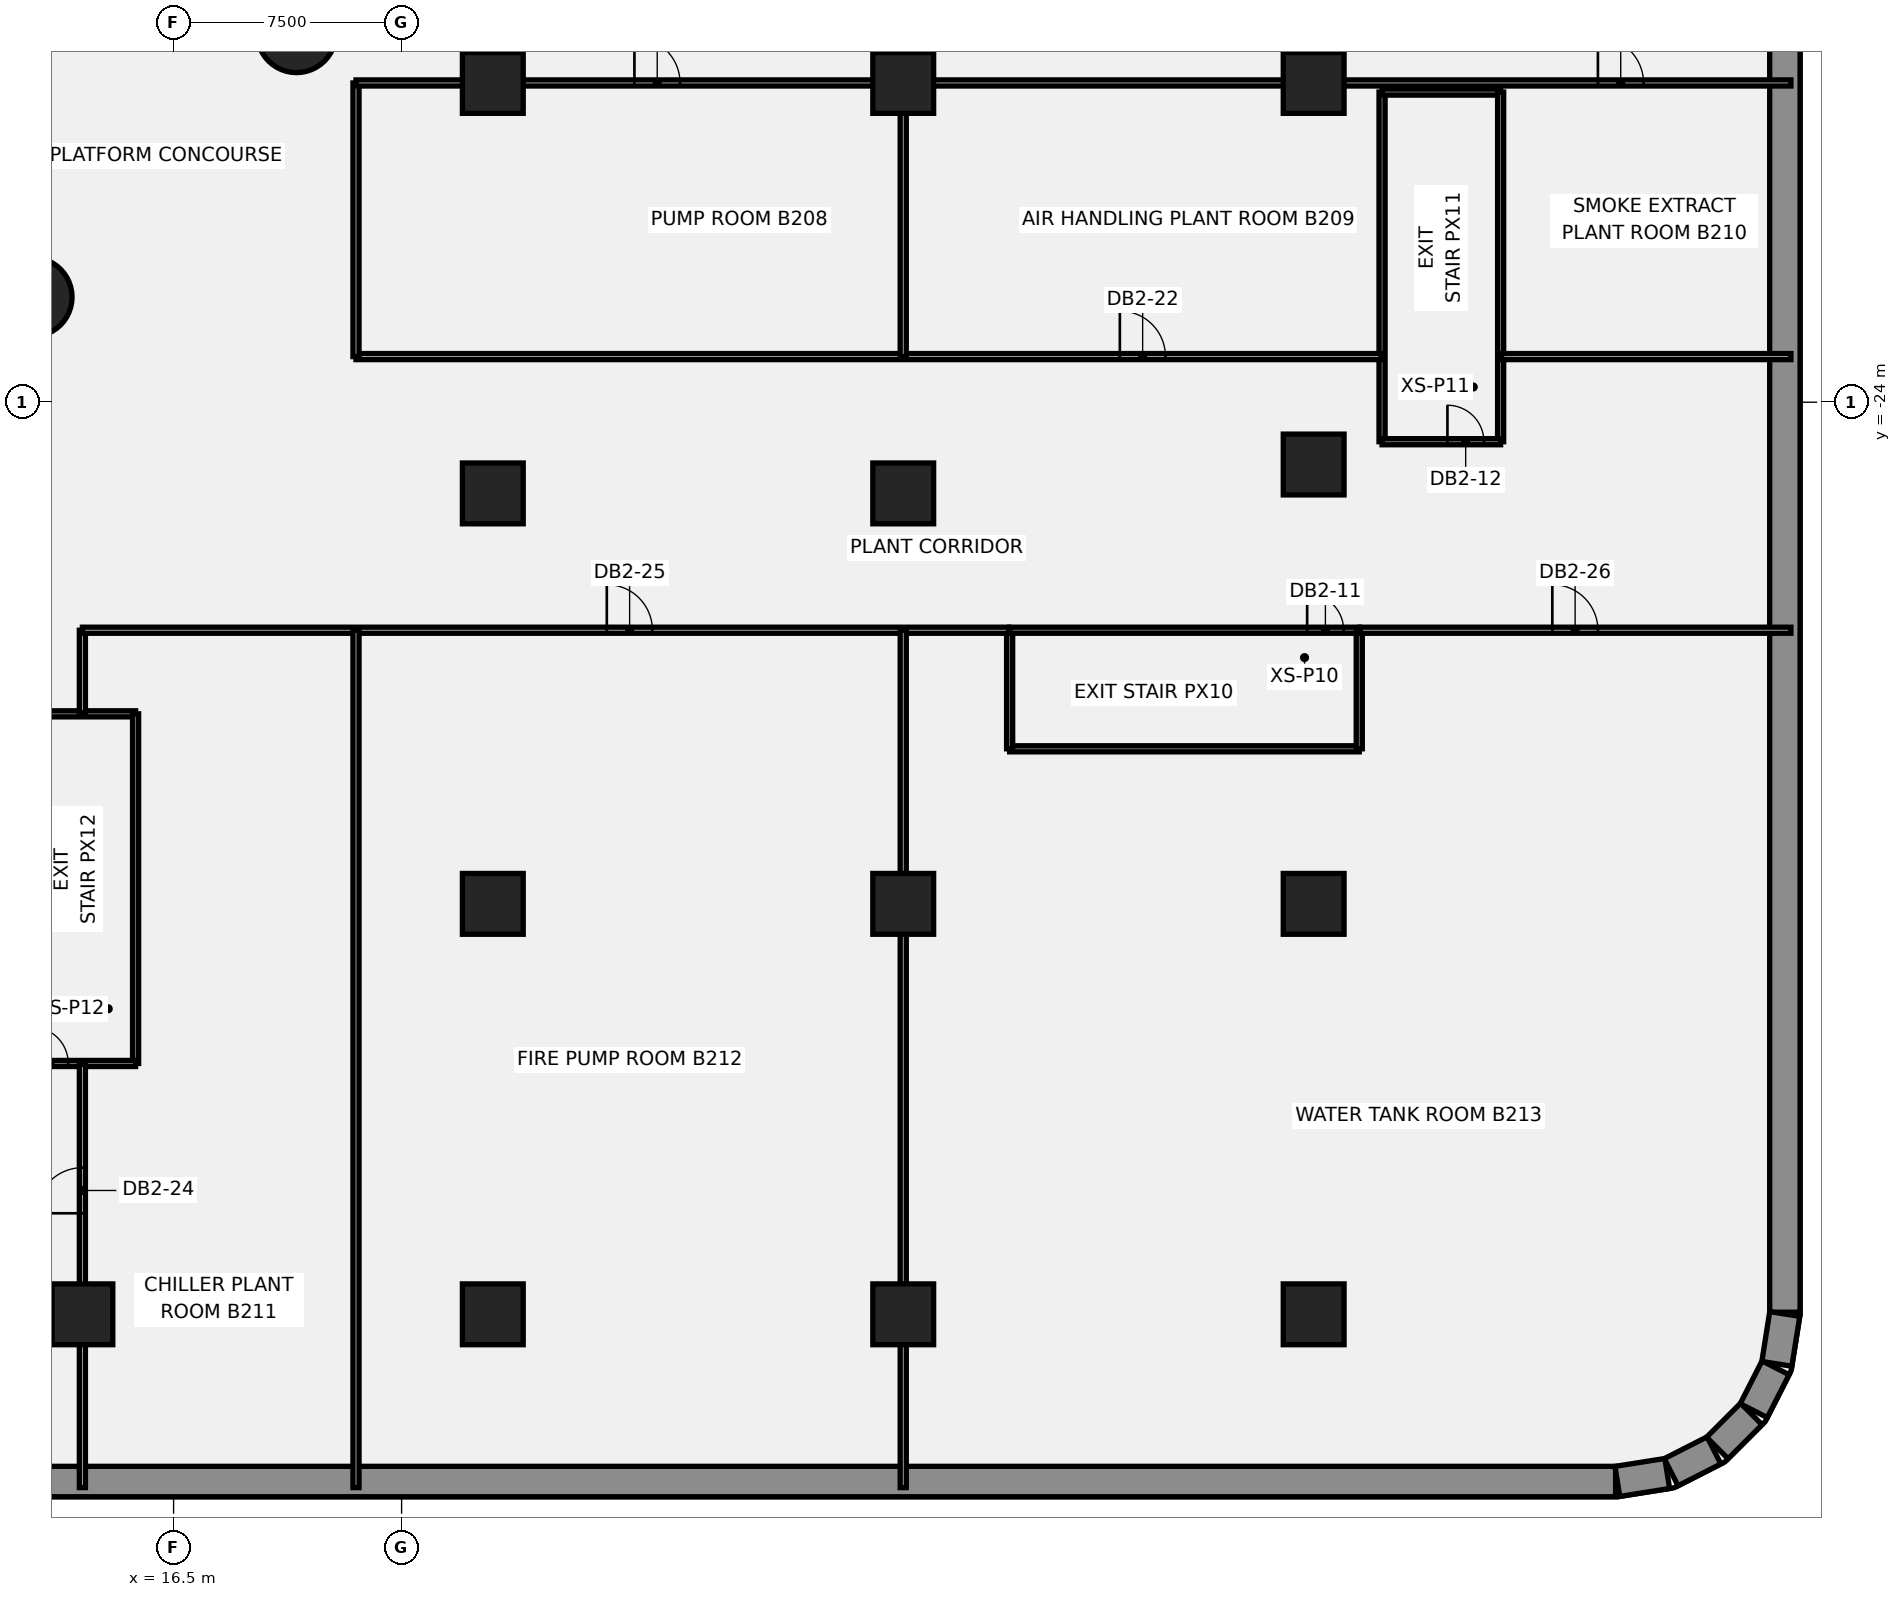
"""IFC4 building model, lengths in metres.
Left out: names, types, materials, properties, quantities, classifications, styles, units other than length and angle.
Written with IfcOpenShell. Run it as: python <this file> out.ifc"""

import sys

from ifc_helpers import new_model, si_unit, direction, frame, frame_2d, origin, origin_2d, place, context, subcontext, project, spatial, rectangle, circle, extrude, element, fill, save


model = new_model("IFC4")
c1 = context("Model", 3, precision=1e-05, world=origin(), true_north=direction((0.0, 1.0)))
c2 = subcontext(c1, "Body", "Model", "MODEL_VIEW")
j1 = project(units=[si_unit("LENGTHUNIT", "METRE"), si_unit("PLANEANGLEUNIT", "RADIAN")], contexts=[c1])
p1 = place(None, origin())
s1 = spatial("IfcSite", under=j1, at=p1, CompositionType="ELEMENT")
p2 = place(p1, origin())
s2 = spatial("IfcBuilding", under=s1, at=p2, CompositionType="ELEMENT")
p3 = place(p2, frame((0.0, 0.0, -14.0)))
s3 = spatial("IfcBuildingStorey", under=s2, at=p3, CompositionType="ELEMENT", Elevation=-14.0)
p4 = place(p3, frame((63.931, -59.5, -0.45), z_axis=(0.0, 0.0, 1.0), x_axis=(-1.0, 0.0, 0.0)))
e1 = element("IfcWall", 1, at=p4, inside=s3, PredefinedType="SOLIDWALL", context=c2, shape_type="SweptSolid", body=[
    extrude(rectangle(XDim=127.863, YDim=1.0, at=frame_2d((63.931, 0.0))), origin(), (0.0, 0.0, 1.0), 7.0),
])
p5 = place(p3, frame((69.5, 53.931, -0.45), z_axis=(0.0, 0.0, 1.0), x_axis=(0.0, -1.0, 0.0)))
e2 = element("IfcWall", 2, at=p5, inside=s3, PredefinedType="SOLIDWALL", context=c2, shape_type="SweptSolid", body=[
    extrude(rectangle(XDim=107.863, YDim=1.0, at=frame_2d((53.931, 0.0))), origin(), (0.0, 0.0, 1.0), 7.0),
])
p6 = place(p3, frame((69.495, -53.99, -0.45), z_axis=(0.0, 0.0, 1.0), x_axis=(-0.156430639922, -0.987688946427, 0.0)))
e3 = element("IfcWall", 3, at=p6, inside=s3, PredefinedType="SOLIDWALL", context=c2, shape_type="SweptSolid", body=[
    extrude(rectangle(XDim=1.661, YDim=1.0, at=frame_2d((0.83, 0.0))), origin(), (0.0, 0.0, 1.0), 7.0),
])
for number, where, z_axis, x_axis in (
    (4, (69.194, -55.759, -0.45), (0.0, 0.0, 1.0), (-0.454, -0.891, 0.0)),
    (5, (68.396, -57.278, -0.45), (0.0, 0.0, 1.0), (-0.707, -0.707, 0.0)),
    (6, (67.168, -58.476, -0.45), (0.0, 0.0, 1.0), (-0.891, -0.454, 0.0)),
):
    element("IfcWall", number, at=place(p3, frame(where, z_axis=z_axis, x_axis=x_axis)), inside=s3, PredefinedType="SOLIDWALL", context=c2, shape_type="SweptSolid", body=[
        extrude(rectangle(XDim=1.581, YDim=1.0, at=frame_2d((0.791, 0.0))), origin(), (0.0, 0.0, 1.0), 7.0),
    ])
p7 = place(p3, frame((65.63, -59.236, -0.45), z_axis=(0.0, 0.0, 1.0), x_axis=(-0.987688946427, -0.156430639922, 0.0)))
e7 = element("IfcWall", 7, at=p7, inside=s3, PredefinedType="SOLIDWALL", context=c2, shape_type="SweptSolid", body=[
    extrude(rectangle(XDim=1.661, YDim=1.0, at=frame_2d((0.83, 0.0))), origin(), (0.0, 0.0, 1.0), 7.0),
])
for number, where, z_axis, x_axis in (
    (8, (11.86, -20.543, -0.45), (0.0, 0.0, 1.0), (1.0, 0.0, 0.0)),
    (9, (20.543, -11.86, -0.45), (0.0, 0.0, 1.0), (1.0, 0.0, 0.0)),
):
    element("IfcColumn", number, at=place(p3, frame(where, z_axis=z_axis, x_axis=x_axis)), inside=s3, PredefinedType="COLUMN", context=c2, shape_type="SweptSolid", body=[
        extrude(circle(Radius=1.3, at=origin_2d()), origin(), (0.0, 0.0, 1.0), 7.0),
    ])
for number, where, z_axis, x_axis in (
    (10, (13.5, -54.0, -0.45), (0.0, 0.0, 1.0), (1.0, 0.0, 0.0)),
    (11, (27.0, -54.0, -0.45), (0.0, 0.0, 1.0), (1.0, 0.0, 0.0)),
    (12, (27.0, -40.5, -0.45), (0.0, 0.0, 1.0), (1.0, 0.0, 0.0)),
    (13, (27.0, -27.0, -0.45), (0.0, 0.0, 1.0), (1.0, 0.0, 0.0)),
    (14, (27.0, -13.5, -0.45), (0.0, 0.0, 1.0), (1.0, 0.0, 0.0)),
    (15, (40.5, -54.0, -0.45), (0.0, 0.0, 1.0), (1.0, 0.0, 0.0)),
    (16, (40.5, -40.5, -0.45), (0.0, 0.0, 1.0), (1.0, 0.0, 0.0)),
    (17, (40.5, -27.0, -0.45), (0.0, 0.0, 1.0), (1.0, 0.0, 0.0)),
    (18, (40.5, -13.5, -0.45), (0.0, 0.0, 1.0), (1.0, 0.0, 0.0)),
    (19, (54.0, -54.0, -0.45), (0.0, 0.0, 1.0), (1.0, 0.0, 0.0)),
    (20, (54.0, -40.5, -0.45), (0.0, 0.0, 1.0), (1.0, 0.0, 0.0)),
    (21, (54.0, -26.05, -0.45), (0.0, 0.0, 1.0), (1.0, 0.0, 0.0)),
    (22, (54.0, -13.5, -0.45), (0.0, 0.0, 1.0), (1.0, 0.0, 0.0)),
):
    element("IfcColumn", number, at=place(p3, frame(where, z_axis=z_axis, x_axis=x_axis)), inside=s3, PredefinedType="COLUMN", context=c2, shape_type="SweptSolid", body=[
        extrude(rectangle(XDim=2.0, YDim=2.0, at=origin_2d()), origin(), (0.0, 0.0, 1.0), 7.0),
    ])
p8 = place(p3, frame((11.35, -34.25, 0.0), z_axis=(0.0, 0.0, 1.0), x_axis=(1.0, 0.0, 0.0)))
e23 = element("IfcWall", 23, at=p8, inside=s3, PredefinedType="PARTITIONING", context=c2, shape_type="SweptSolid", body=[
    extrude(rectangle(XDim=3.9, YDim=0.2, at=frame_2d((1.95, 0.0))), origin(), (0.0, 0.0, 1.0), 6.55),
])
p9 = place(p3, frame((15.25, -45.75, 0.0), z_axis=(0.0, 0.0, 1.0), x_axis=(0.0, 1.0, 0.0)))
e24 = element("IfcWall", 24, at=p9, inside=s3, PredefinedType="PARTITIONING", context=c2, shape_type="SweptSolid", body=[
    extrude(rectangle(XDim=11.5, YDim=0.2, at=frame_2d((5.75, 0.0))), origin(), (0.0, 0.0, 1.0), 6.55),
])
p10 = place(p3, frame((11.35, -45.75, 0.0), z_axis=(0.0, 0.0, 1.0), x_axis=(1.0, 0.0, 0.0)))
e25 = element("IfcWall", 25, at=p10, inside=s3, PredefinedType="PARTITIONING", context=c2, shape_type="SweptSolid", body=[
    extrude(rectangle(XDim=3.9, YDim=0.2, at=frame_2d((1.95, 0.0))), origin(), (0.0, 0.0, 1.0), 6.55),
])
p11 = place(p10, frame((0.485, 0.0, 0.0)))
e26 = element("IfcOpeningElement", 26, at=p11, cuts=e25, PredefinedType="OPENING", context=c2, shape_type="SweptSolid", body=[
    extrude(rectangle(XDim=1.2, YDim=2.1, at=frame_2d((0.6, 1.05))), frame((0.0, 0.11, 0.0), z_axis=(0.0, -1.0, 0.0), x_axis=(1.0, 0.0, 0.0)), (0.0, 0.0, 1.0), 0.22),
])
p12 = place(p3, frame((44.0, -35.4, 0.0), z_axis=(0.0, 0.0, 1.0), x_axis=(1.0, 0.0, 0.0)))
e27 = element("IfcWall", 27, at=p12, inside=s3, PredefinedType="PARTITIONING", context=c2, shape_type="SweptSolid", body=[
    extrude(rectangle(XDim=11.5, YDim=0.2, at=frame_2d((5.75, 0.0))), origin(), (0.0, 0.0, 1.0), 6.55),
])
p13 = place(p3, frame((44.0, -35.4, 0.0), z_axis=(0.0, 0.0, 1.0), x_axis=(0.0, 1.0, 0.0)))
e28 = element("IfcWall", 28, at=p13, inside=s3, PredefinedType="PARTITIONING", context=c2, shape_type="SweptSolid", body=[
    extrude(rectangle(XDim=3.9, YDim=0.2, at=frame_2d((1.95, 0.0))), origin(), (0.0, 0.0, 1.0), 6.55),
])
p14 = place(p3, frame((44.0, -31.5, 0.0), z_axis=(0.0, 0.0, 1.0), x_axis=(1.0, 0.0, 0.0)))
e29 = element("IfcWall", 29, at=p14, inside=s3, PredefinedType="PARTITIONING", context=c2, shape_type="SweptSolid", body=[
    extrude(rectangle(XDim=11.5, YDim=0.2, at=frame_2d((5.75, 0.0))), origin(), (0.0, 0.0, 1.0), 6.55),
])
p15 = place(p14, frame((9.786, 0.0, 0.0)))
e30 = element("IfcOpeningElement", 30, at=p15, cuts=e29, PredefinedType="OPENING", context=c2, shape_type="SweptSolid", body=[
    extrude(rectangle(XDim=1.2, YDim=2.1, at=frame_2d((0.6, 1.05))), frame((0.0, 0.11, 0.0), z_axis=(0.0, -1.0, 0.0), x_axis=(1.0, 0.0, 0.0)), (0.0, 0.0, 1.0), 0.22),
])
p16 = place(p3, frame((55.5, -35.4, 0.0), z_axis=(0.0, 0.0, 1.0), x_axis=(0.0, 1.0, 0.0)))
e31 = element("IfcWall", 31, at=p16, inside=s3, PredefinedType="PARTITIONING", context=c2, shape_type="SweptSolid", body=[
    extrude(rectangle(XDim=3.9, YDim=0.2, at=frame_2d((1.95, 0.0))), origin(), (0.0, 0.0, 1.0), 6.55),
])
p17 = place(p3, frame((56.25, -25.3, 0.0), z_axis=(0.0, 0.0, 1.0), x_axis=(0.0, 1.0, 0.0)))
e32 = element("IfcWall", 32, at=p17, inside=s3, PredefinedType="PARTITIONING", context=c2, shape_type="SweptSolid", body=[
    extrude(rectangle(XDim=11.5, YDim=0.2, at=frame_2d((5.75, 0.0))), origin(), (0.0, 0.0, 1.0), 6.55),
])
p18 = place(p3, frame((56.25, -13.8, 0.0), z_axis=(0.0, 0.0, 1.0), x_axis=(1.0, 0.0, 0.0)))
e33 = element("IfcWall", 33, at=p18, inside=s3, PredefinedType="PARTITIONING", context=c2, shape_type="SweptSolid", body=[
    extrude(rectangle(XDim=3.9, YDim=0.2, at=frame_2d((1.95, 0.0))), origin(), (0.0, 0.0, 1.0), 6.55),
])
p19 = place(p3, frame((60.15, -25.3, 0.0), z_axis=(0.0, 0.0, 1.0), x_axis=(0.0, 1.0, 0.0)))
e34 = element("IfcWall", 34, at=p19, inside=s3, PredefinedType="PARTITIONING", context=c2, shape_type="SweptSolid", body=[
    extrude(rectangle(XDim=11.5, YDim=0.2, at=frame_2d((5.75, 0.0))), origin(), (0.0, 0.0, 1.0), 6.55),
])
p20 = place(p3, frame((56.25, -25.3, 0.0), z_axis=(0.0, 0.0, 1.0), x_axis=(1.0, 0.0, 0.0)))
e35 = element("IfcWall", 35, at=p20, inside=s3, PredefinedType="PARTITIONING", context=c2, shape_type="SweptSolid", body=[
    extrude(rectangle(XDim=3.9, YDim=0.2, at=frame_2d((1.95, 0.0))), origin(), (0.0, 0.0, 1.0), 6.55),
])
p21 = place(p20, frame((2.15, 0.0, 0.0)))
e36 = element("IfcOpeningElement", 36, at=p21, cuts=e35, PredefinedType="OPENING", context=c2, shape_type="SweptSolid", body=[
    extrude(rectangle(XDim=1.2, YDim=2.1, at=frame_2d((0.6, 1.05))), frame((0.0, 0.11, 0.0), z_axis=(0.0, -1.0, 0.0), x_axis=(1.0, 0.0, 0.0)), (0.0, 0.0, 1.0), 0.22),
])
p22 = place(p3, frame((13.5, -59.699, 0.0), z_axis=(0.0, 0.0, 1.0), x_axis=(0.0, 1.0, 0.0)))
e37 = element("IfcWall", 37, at=p22, inside=s3, PredefinedType="PARTITIONING", context=c2, shape_type="SweptSolid", body=[
    extrude(rectangle(XDim=13.919, YDim=0.2, at=frame_2d((6.959, 0.0))), origin(), (0.0, 0.0, 1.0), 6.55),
])
p23 = place(p22, frame((9.022, 0.0, 0.0)))
e38 = element("IfcOpeningElement", 38, at=p23, cuts=e37, PredefinedType="OPENING", context=c2, shape_type="SweptSolid", body=[
    extrude(rectangle(XDim=1.5, YDim=2.1, at=frame_2d((0.75, 1.05))), frame((0.0, 0.11, 0.0), z_axis=(0.0, -1.0, 0.0), x_axis=(1.0, 0.0, 0.0)), (0.0, 0.0, 1.0), 0.22),
])
p24 = place(p3, frame((13.5, -34.22, 0.0), z_axis=(0.0, 0.0, 1.0), x_axis=(0.0, 1.0, 0.0)))
e39 = element("IfcWall", 39, at=p24, inside=s3, PredefinedType="PARTITIONING", context=c2, shape_type="SweptSolid", body=[
    extrude(rectangle(XDim=2.72, YDim=0.2, at=frame_2d((1.36, 0.0))), origin(), (0.0, 0.0, 1.0), 6.55),
])
p25 = place(p3, frame((13.5, -31.5, 0.0), z_axis=(0.0, 0.0, 1.0), x_axis=(1.0, 0.0, 0.0)))
e40 = element("IfcWall", 40, at=p25, inside=s3, PredefinedType="PARTITIONING", context=c2, shape_type="SweptSolid", body=[
    extrude(rectangle(XDim=30.47, YDim=0.2, at=frame_2d((15.235, 0.0))), origin(), (0.0, 0.0, 1.0), 6.55),
])
p26 = place(p25, frame((17.25, 0.0, 0.0)))
e41 = element("IfcOpeningElement", 41, at=p26, cuts=e40, PredefinedType="OPENING", context=c2, shape_type="SweptSolid", body=[
    extrude(rectangle(XDim=1.5, YDim=2.1, at=frame_2d((0.75, 1.05))), frame((0.0, 0.11, 0.0), z_axis=(0.0, -1.0, 0.0), x_axis=(1.0, 0.0, 0.0)), (0.0, 0.0, 1.0), 0.22),
])
for number, where, z_axis, x_axis in (
    (42, (22.5, -59.699, 0.0), (0.0, 0.0, 1.0), (0.0, 1.0, 0.0)),
    (43, (40.5, -59.699, 0.0), (0.0, 0.0, 1.0), (0.0, 1.0, 0.0)),
):
    element("IfcWall", number, at=place(p3, frame(where, z_axis=z_axis, x_axis=x_axis)), inside=s3, PredefinedType="PARTITIONING", context=c2, shape_type="SweptSolid", body=[
        extrude(rectangle(XDim=28.199, YDim=0.2, at=frame_2d((14.1, 0.0))), origin(), (0.0, 0.0, 1.0), 6.55),
    ])
p27 = place(p3, frame((22.5, -22.5, 0.0), z_axis=(0.0, 0.0, 1.0), x_axis=(1.0, 0.0, 0.0)))
e44 = element("IfcWall", 44, at=p27, inside=s3, PredefinedType="PARTITIONING", context=c2, shape_type="SweptSolid", body=[
    extrude(rectangle(XDim=33.72, YDim=0.2, at=frame_2d((16.86, 0.0))), origin(), (0.0, 0.0, 1.0), 6.55),
])
p28 = place(p27, frame((25.125, 0.0, 0.0)))
e45 = element("IfcOpeningElement", 45, at=p28, cuts=e44, PredefinedType="OPENING", context=c2, shape_type="SweptSolid", body=[
    extrude(rectangle(XDim=1.5, YDim=2.1, at=frame_2d((0.75, 1.05))), frame((0.0, 0.11, 0.0), z_axis=(0.0, -1.0, 0.0), x_axis=(1.0, 0.0, 0.0)), (0.0, 0.0, 1.0), 0.22),
])
for number, where, z_axis, x_axis in (
    (46, (40.5, -22.5, 0.0), (0.0, 0.0, 1.0), (0.0, 1.0, 0.0)),
    (47, (22.5, -22.5, 0.0), (0.0, 0.0, 1.0), (0.0, 1.0, 0.0)),
):
    element("IfcWall", number, at=place(p3, frame(where, z_axis=z_axis, x_axis=x_axis)), inside=s3, PredefinedType="PARTITIONING", context=c2, shape_type="SweptSolid", body=[
        extrude(rectangle(XDim=9.0, YDim=0.2, at=frame_2d((4.5, 0.0))), origin(), (0.0, 0.0, 1.0), 6.55),
    ])
p29 = place(p3, frame((22.5, -13.5, 0.0), z_axis=(0.0, 0.0, 1.0), x_axis=(1.0, 0.0, 0.0)))
e48 = element("IfcWall", 48, at=p29, inside=s3, PredefinedType="PARTITIONING", context=c2, shape_type="SweptSolid", body=[
    extrude(rectangle(XDim=47.199, YDim=0.2, at=frame_2d((23.6, 0.0))), origin(), (0.0, 0.0, 1.0), 6.55),
])
p30 = place(p29, frame((9.158, 0.0, 0.0)))
e49 = element("IfcOpeningElement", 49, at=p30, cuts=e48, PredefinedType="OPENING", context=c2, shape_type="SweptSolid", body=[
    extrude(rectangle(XDim=1.5, YDim=2.1, at=frame_2d((0.75, 1.05))), frame((0.0, 0.11, 0.0), z_axis=(0.0, -1.0, 0.0), x_axis=(1.0, 0.0, 0.0)), (0.0, 0.0, 1.0), 0.22),
])
p31 = place(p29, frame((40.85, 0.0, 0.0)))
e50 = element("IfcOpeningElement", 50, at=p31, cuts=e48, PredefinedType="OPENING", context=c2, shape_type="SweptSolid", body=[
    extrude(rectangle(XDim=1.5, YDim=2.1, at=frame_2d((0.75, 1.05))), frame((0.0, 0.11, 0.0), z_axis=(0.0, -1.0, 0.0), x_axis=(1.0, 0.0, 0.0)), (0.0, 0.0, 1.0), 0.22),
])
p32 = place(p3, frame((55.53, -31.5, 0.0), z_axis=(0.0, 0.0, 1.0), x_axis=(1.0, 0.0, 0.0)))
e51 = element("IfcWall", 51, at=p32, inside=s3, PredefinedType="PARTITIONING", context=c2, shape_type="SweptSolid", body=[
    extrude(rectangle(XDim=14.169, YDim=0.2, at=frame_2d((7.084, 0.0))), origin(), (0.0, 0.0, 1.0), 6.55),
])
p33 = place(p32, frame((6.32, 0.0, 0.0)))
e52 = element("IfcOpeningElement", 52, at=p33, cuts=e51, PredefinedType="OPENING", context=c2, shape_type="SweptSolid", body=[
    extrude(rectangle(XDim=1.5, YDim=2.1, at=frame_2d((0.75, 1.05))), frame((0.0, 0.11, 0.0), z_axis=(0.0, -1.0, 0.0), x_axis=(1.0, 0.0, 0.0)), (0.0, 0.0, 1.0), 0.22),
])
p34 = place(p3, frame((60.18, -22.5, 0.0), z_axis=(0.0, 0.0, 1.0), x_axis=(1.0, 0.0, 0.0)))
e53 = element("IfcWall", 53, at=p34, inside=s3, PredefinedType="PARTITIONING", context=c2, shape_type="SweptSolid", body=[
    extrude(rectangle(XDim=9.519, YDim=0.2, at=frame_2d((4.76, 0.0))), origin(), (0.0, 0.0, 1.0), 6.55),
])
p35 = place(p15, origin())
e54 = element("IfcDoor", 54, at=p35, inside=s3, OperationType="SINGLE_SWING_LEFT", PredefinedType="DOOR", context=c2, shape_type="SweptSolid", body=[
    extrude(rectangle(XDim=1.2, YDim=2.1, at=frame_2d((0.6, 1.05))), frame((0.0, 0.025, 0.0), z_axis=(0.0, -1.0, 0.0), x_axis=(1.0, 0.0, 0.0)), (0.0, 0.0, 1.0), 0.05),
])
fill(e30, e54)
p36 = place(p21, origin())
e55 = element("IfcDoor", 55, at=p36, inside=s3, OperationType="SINGLE_SWING_RIGHT", PredefinedType="DOOR", context=c2, shape_type="SweptSolid", body=[
    extrude(rectangle(XDim=1.2, YDim=2.1, at=frame_2d((0.6, 1.05))), frame((0.0, 0.025, 0.0), z_axis=(0.0, -1.0, 0.0), x_axis=(1.0, 0.0, 0.0)), (0.0, 0.0, 1.0), 0.05),
])
fill(e36, e55)
p37 = place(p11, origin())
e56 = element("IfcDoor", 56, at=p37, inside=s3, OperationType="SINGLE_SWING_LEFT", PredefinedType="DOOR", context=c2, shape_type="SweptSolid", body=[
    extrude(rectangle(XDim=1.2, YDim=2.1, at=frame_2d((0.6, 1.05))), frame((0.0, 0.025, 0.0), z_axis=(0.0, -1.0, 0.0), x_axis=(1.0, 0.0, 0.0)), (0.0, 0.0, 1.0), 0.05),
])
fill(e26, e56)
p38 = place(p30, origin())
e57 = element("IfcDoor", 57, at=p38, inside=s3, OperationType="SINGLE_SWING_LEFT", PredefinedType="DOOR", context=c2, shape_type="SweptSolid", body=[
    extrude(rectangle(XDim=1.5, YDim=2.1, at=frame_2d((0.75, 1.05))), frame((0.0, 0.025, 0.0), z_axis=(0.0, -1.0, 0.0), x_axis=(1.0, 0.0, 0.0)), (0.0, 0.0, 1.0), 0.05),
])
fill(e49, e57)
p39 = place(p28, origin())
e58 = element("IfcDoor", 58, at=p39, inside=s3, OperationType="SINGLE_SWING_RIGHT", PredefinedType="DOOR", context=c2, shape_type="SweptSolid", body=[
    extrude(rectangle(XDim=1.5, YDim=2.1, at=frame_2d((0.75, 1.05))), frame((0.0, 0.025, 0.0), z_axis=(0.0, -1.0, 0.0), x_axis=(1.0, 0.0, 0.0)), (0.0, 0.0, 1.0), 0.05),
])
fill(e45, e58)
p40 = place(p31, origin())
e59 = element("IfcDoor", 59, at=p40, inside=s3, OperationType="SINGLE_SWING_LEFT", PredefinedType="DOOR", context=c2, shape_type="SweptSolid", body=[
    extrude(rectangle(XDim=1.5, YDim=2.1, at=frame_2d((0.75, 1.05))), frame((0.0, 0.025, 0.0), z_axis=(0.0, -1.0, 0.0), x_axis=(1.0, 0.0, 0.0)), (0.0, 0.0, 1.0), 0.05),
])
fill(e50, e59)
p41 = place(p23, origin())
e60 = element("IfcDoor", 60, at=p41, inside=s3, OperationType="SINGLE_SWING_RIGHT", PredefinedType="DOOR", context=c2, shape_type="SweptSolid", body=[
    extrude(rectangle(XDim=1.5, YDim=2.1, at=frame_2d((0.75, 1.05))), frame((0.0, 0.025, 0.0), z_axis=(0.0, -1.0, 0.0), x_axis=(1.0, 0.0, 0.0)), (0.0, 0.0, 1.0), 0.05),
])
fill(e38, e60)
p42 = place(p26, origin())
e61 = element("IfcDoor", 61, at=p42, inside=s3, OperationType="SINGLE_SWING_LEFT", PredefinedType="DOOR", context=c2, shape_type="SweptSolid", body=[
    extrude(rectangle(XDim=1.5, YDim=2.1, at=frame_2d((0.75, 1.05))), frame((0.0, 0.025, 0.0), z_axis=(0.0, -1.0, 0.0), x_axis=(1.0, 0.0, 0.0)), (0.0, 0.0, 1.0), 0.05),
])
fill(e41, e61)
p43 = place(p33, origin())
e62 = element("IfcDoor", 62, at=p43, inside=s3, OperationType="SINGLE_SWING_RIGHT", PredefinedType="DOOR", context=c2, shape_type="SweptSolid", body=[
    extrude(rectangle(XDim=1.5, YDim=2.1, at=frame_2d((0.75, 1.05))), frame((0.0, 0.025, 0.0), z_axis=(0.0, -1.0, 0.0), x_axis=(1.0, 0.0, 0.0)), (0.0, 0.0, 1.0), 0.05),
])
fill(e52, e62)
save(model, sys.argv[1])
